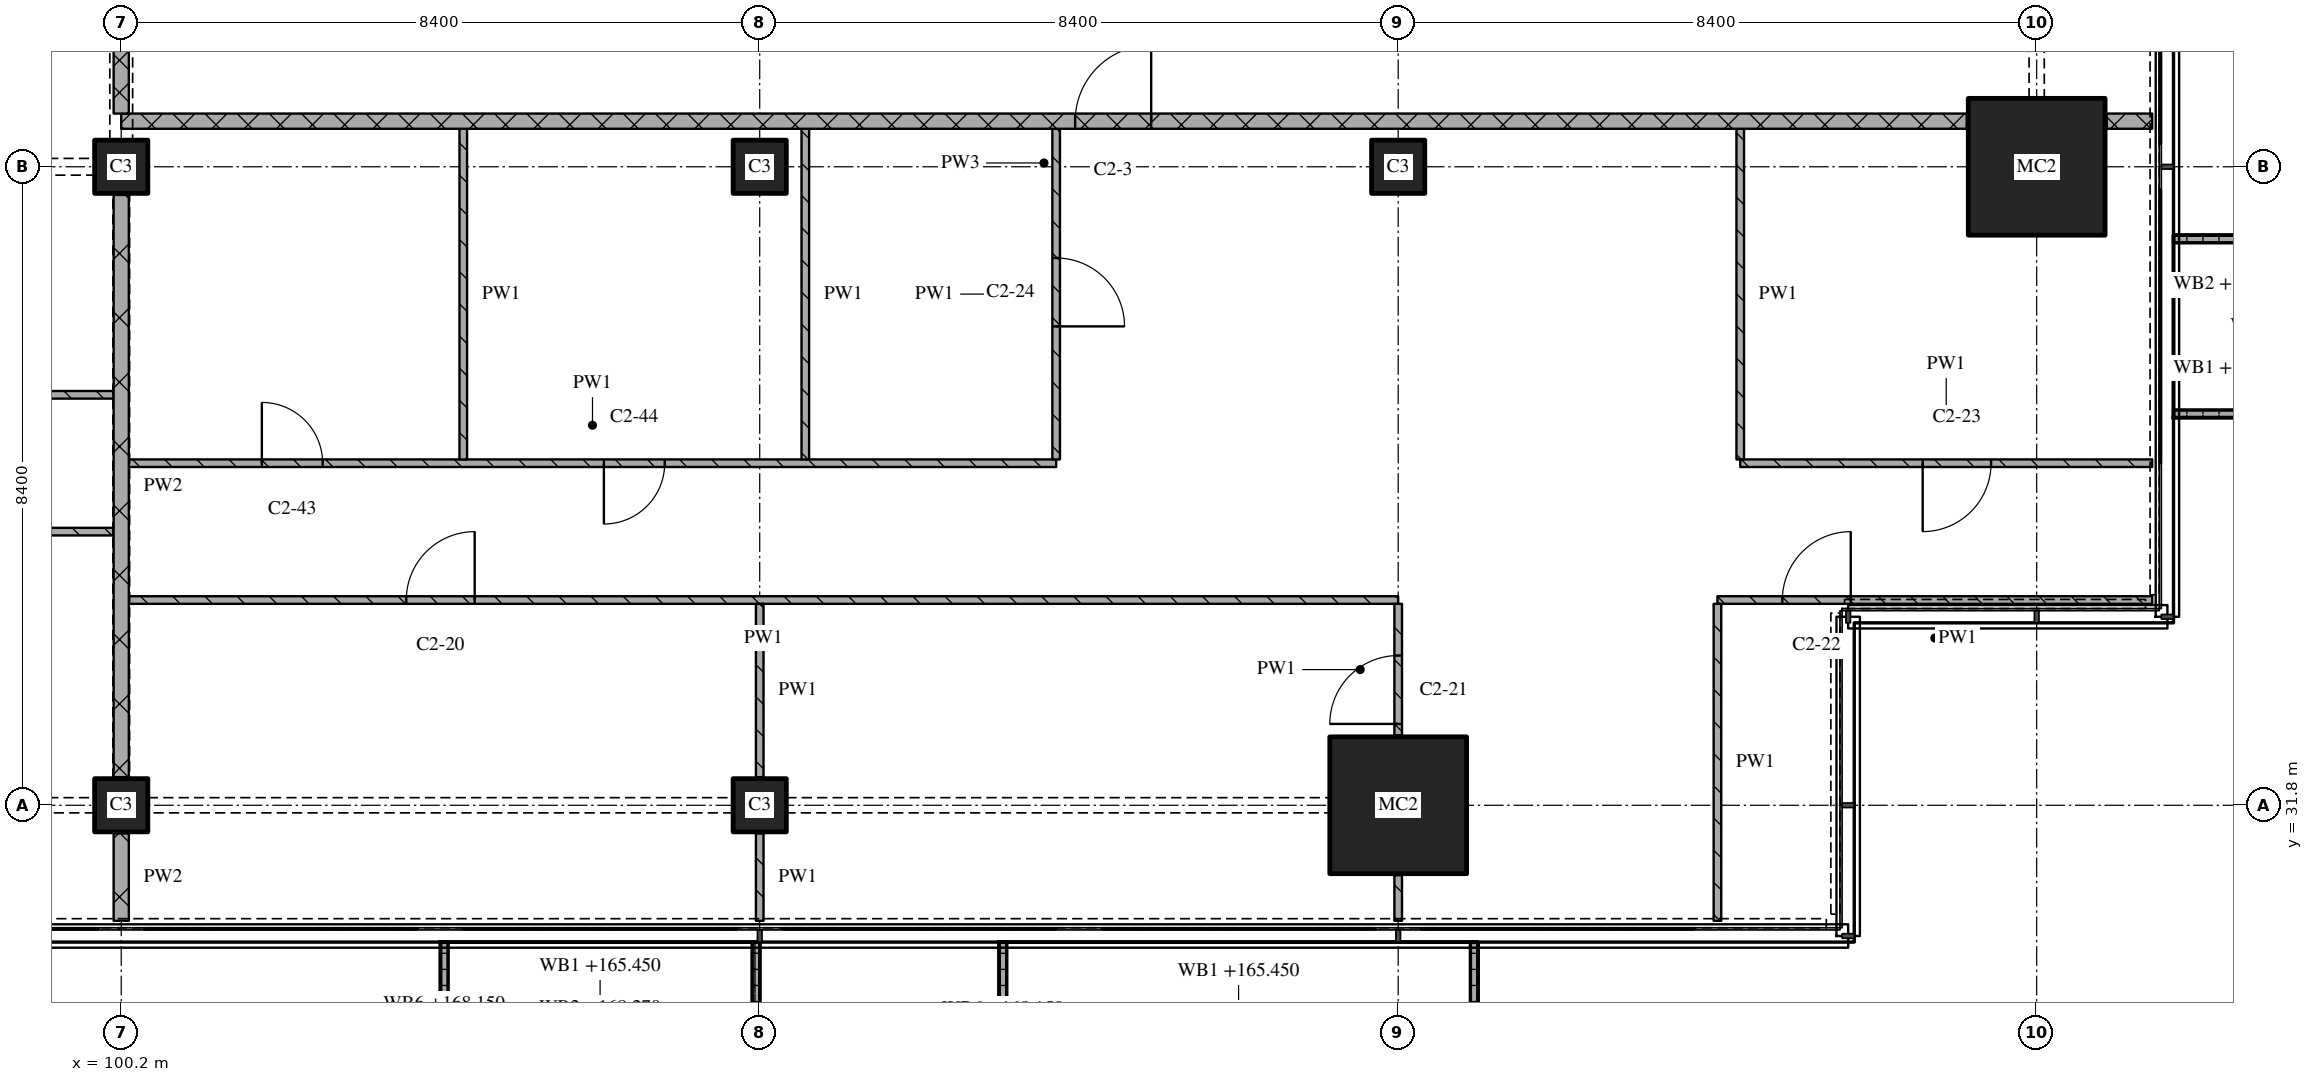
"""IFC4 building model, lengths in metres.
Left out: names, types, materials, properties, quantities, classifications, styles, units other than length and angle.
Written with IfcOpenShell. Run it as: python <this file> out.ifc"""

import sys

from ifc_helpers import new_model, si_unit, direction, frame, frame_2d, origin, origin_2d, place, context, subcontext, project, spatial, polyline, rectangle, outline, extrude, element, fill, save


model = new_model("IFC4")
c1 = context("Model", 3, precision=1e-05, world=origin(), true_north=direction((0.0, 1.0)))
c2 = subcontext(c1, "Body", "Model", "MODEL_VIEW")
j1 = project(units=[si_unit("LENGTHUNIT", "METRE"), si_unit("PLANEANGLEUNIT", "RADIAN")], contexts=[c1])
p1 = place(None, origin())
s1 = spatial("IfcSite", under=j1, at=p1, CompositionType="ELEMENT")
p2 = place(p1, origin())
s2 = spatial("IfcBuilding", under=s1, at=p2, CompositionType="ELEMENT")
p3 = place(p2, frame((0.0, 0.0, 165.45)))
s3 = spatial("IfcBuildingStorey", under=s2, at=p3, CompositionType="ELEMENT", Elevation=165.45)
for number, where, z_axis, x_axis in (
    (1, (100.2, 31.8, 0.0), (0.0, 0.0, 1.0), (1.0, 0.0, 0.0)),
    (2, (100.2, 40.2, 0.0), (0.0, 0.0, 1.0), (1.0, 0.0, 0.0)),
    (3, (108.6, 31.8, 0.0), (0.0, 0.0, 1.0), (1.0, 0.0, 0.0)),
    (4, (108.6, 40.2, 0.0), (0.0, 0.0, 1.0), (1.0, 0.0, 0.0)),
):
    element("IfcColumn", number, at=place(p3, frame(where, z_axis=z_axis, x_axis=x_axis)), inside=s3, PredefinedType="COLUMN", context=c2, shape_type="SweptSolid", body=[
        extrude(rectangle(XDim=0.7, YDim=0.7, at=origin_2d()), origin(), (0.0, 0.0, 1.0), 3.6),
    ])
p4 = place(p3, frame((117.0, 31.8, 0.0), z_axis=(0.0, 0.0, 1.0), x_axis=(1.0, 0.0, 0.0)))
e5 = element("IfcColumn", 5, at=p4, inside=s3, PredefinedType="COLUMN", context=c2, shape_type="SweptSolid", body=[
    extrude(rectangle(XDim=1.8, YDim=1.8, at=origin_2d()), origin(), (0.0, 0.0, 1.0), 3.6),
])
p5 = place(p3, frame((117.0, 40.2, 0.0), z_axis=(0.0, 0.0, 1.0), x_axis=(1.0, 0.0, 0.0)))
e6 = element("IfcColumn", 6, at=p5, inside=s3, PredefinedType="COLUMN", context=c2, shape_type="SweptSolid", body=[
    extrude(rectangle(XDim=0.7, YDim=0.7, at=origin_2d()), origin(), (0.0, 0.0, 1.0), 3.6),
])
p6 = place(p3, frame((125.4, 40.2, 0.0), z_axis=(0.0, 0.0, 1.0), x_axis=(1.0, 0.0, 0.0)))
e7 = element("IfcColumn", 7, at=p6, inside=s3, PredefinedType="COLUMN", context=c2, shape_type="SweptSolid", body=[
    extrude(rectangle(XDim=1.8, YDim=1.8, at=origin_2d()), origin(), (0.0, 0.0, 1.0), 3.6),
])
p7 = place(p3, origin())
e8 = element("IfcWall", 8, at=p7, inside=s3, PredefinedType="SOLIDWALL", context=c2, shape_type="SweptSolid", body=[
    extrude(outline(polyline([(104.4, 30.0), (104.5, 30.0), (104.5, 28.367), (108.5, 28.367), (108.5, 30.0), (108.6, 30.0), (108.6, 28.267), (104.4, 28.267), (104.4, 30.0)])), origin(), (0.0, 0.0, 1.0), 1.0),
])
p8 = place(p3, origin())
e9 = element("IfcWall", 9, at=p8, inside=s3, PredefinedType="SOLIDWALL", context=c2, shape_type="SweptSolid", body=[
    extrude(outline(polyline([(111.75, 30.0), (111.85, 30.0), (111.85, 28.233), (117.95, 28.233), (117.95, 30.0), (118.05, 30.0), (118.05, 28.133), (111.75, 28.133), (111.75, 30.0)])), origin(), (0.0, 0.0, 1.0), 1.0),
])
p9 = place(p3, origin())
e10 = element("IfcWall", 10, at=p9, inside=s3, PredefinedType="SOLIDWALL", context=c2, shape_type="SweptSolid", body=[
    extrude(outline(polyline([(127.2, 36.9), (127.2, 37.0), (128.7, 37.0), (128.7, 39.2), (127.2, 39.2), (127.2, 39.3), (128.8, 39.3), (128.8, 36.9), (127.2, 36.9)])), origin(), (0.0, 0.0, 1.0), 1.0),
])
p10 = place(p3, frame((117.0, 34.5, 0.0), z_axis=(0.0, 0.0, 1.0), x_axis=(-1.0, 0.0, 0.0)))
e11 = element("IfcWall", 11, at=p10, inside=s3, PredefinedType="PARTITIONING", context=c2, shape_type="SweptSolid", body=[
    extrude(rectangle(XDim=16.7, YDim=0.1, at=frame_2d((8.35, 0.0))), origin(), (0.0, 0.0, 1.0), 3.32),
])
p11 = place(p10, frame((12.15, 0.0, 0.0)))
e12 = element("IfcOpeningElement", 12, at=p11, cuts=e11, PredefinedType="OPENING", context=c2, shape_type="SweptSolid", body=[
    extrude(rectangle(XDim=0.9, YDim=2.1, at=frame_2d((0.45, 1.05))), frame((0.0, 0.06, 0.0), z_axis=(0.0, -1.0, 0.0), x_axis=(1.0, 0.0, 0.0)), (0.0, 0.0, 1.0), 0.12),
])
p12 = place(p3, frame((126.92, 34.5, 0.0), z_axis=(0.0, 0.0, 1.0), x_axis=(-1.0, 0.0, 0.0)))
e13 = element("IfcWall", 13, at=p12, inside=s3, PredefinedType="PARTITIONING", context=c2, shape_type="SweptSolid", body=[
    extrude(rectangle(XDim=5.72, YDim=0.1, at=frame_2d((2.86, 0.0))), origin(), (0.0, 0.0, 1.0), 3.32),
])
p13 = place(p12, frame((3.966, 0.0, 0.0)))
e14 = element("IfcOpeningElement", 14, at=p13, cuts=e13, PredefinedType="OPENING", context=c2, shape_type="SweptSolid", body=[
    extrude(rectangle(XDim=0.9, YDim=2.1, at=frame_2d((0.45, 1.05))), frame((0.0, 0.06, 0.0), z_axis=(0.0, -1.0, 0.0), x_axis=(1.0, 0.0, 0.0)), (0.0, 0.0, 1.0), 0.12),
])
p14 = place(p3, frame((100.1, 35.4, 0.0), z_axis=(0.0, 0.0, 1.0), x_axis=(-1.0, 0.0, 0.0)))
e15 = element("IfcWall", 15, at=p14, inside=s3, PredefinedType="PARTITIONING", context=c2, shape_type="SweptSolid", body=[
    extrude(rectangle(XDim=20.9, YDim=0.1, at=frame_2d((10.45, 0.0))), origin(), (0.0, 0.0, 1.0), 3.32),
])
p15 = place(p14, frame((1.55, 0.0, 0.0)))
e16 = element("IfcOpeningElement", 16, at=p15, cuts=e15, PredefinedType="OPENING", context=c2, shape_type="SweptSolid", body=[
    extrude(rectangle(XDim=0.9, YDim=2.1, at=frame_2d((0.45, 1.05))), frame((0.0, 0.06, 0.0), z_axis=(0.0, -1.0, 0.0), x_axis=(1.0, 0.0, 0.0)), (0.0, 0.0, 1.0), 0.12),
])
p16 = place(p14, frame((7.85, 0.0, 0.0)))
e17 = element("IfcOpeningElement", 17, at=p16, cuts=e15, PredefinedType="OPENING", context=c2, shape_type="SweptSolid", body=[
    extrude(rectangle(XDim=0.9, YDim=2.1, at=frame_2d((0.45, 1.05))), frame((0.0, 0.06, 0.0), z_axis=(0.0, -1.0, 0.0), x_axis=(1.0, 0.0, 0.0)), (0.0, 0.0, 1.0), 0.12),
])
p17 = place(p14, frame((16.25, 0.0, 0.0)))
e18 = element("IfcOpeningElement", 18, at=p17, cuts=e15, PredefinedType="OPENING", context=c2, shape_type="SweptSolid", body=[
    extrude(rectangle(XDim=0.9, YDim=2.1, at=frame_2d((0.45, 1.05))), frame((0.0, 0.06, 0.0), z_axis=(0.0, -1.0, 0.0), x_axis=(1.0, 0.0, 0.0)), (0.0, 0.0, 1.0), 0.12),
])
p18 = place(p3, frame((100.3, 36.3, 0.0), z_axis=(0.0, 0.0, 1.0), x_axis=(1.0, 0.0, 0.0)))
e19 = element("IfcWall", 19, at=p18, inside=s3, PredefinedType="PARTITIONING", context=c2, shape_type="SweptSolid", body=[
    extrude(rectangle(XDim=12.2, YDim=0.1, at=frame_2d((6.1, 0.0))), origin(), (0.0, 0.0, 1.0), 3.32),
])
p19 = place(p18, frame((1.75, 0.0, 0.0)))
e20 = element("IfcOpeningElement", 20, at=p19, cuts=e19, PredefinedType="OPENING", context=c2, shape_type="SweptSolid", body=[
    extrude(rectangle(XDim=0.8, YDim=2.1, at=frame_2d((0.4, 1.05))), frame((0.0, 0.06, 0.0), z_axis=(0.0, -1.0, 0.0), x_axis=(1.0, 0.0, 0.0)), (0.0, 0.0, 1.0), 0.12),
])
p20 = place(p18, frame((6.25, 0.0, 0.0)))
e21 = element("IfcOpeningElement", 21, at=p20, cuts=e19, PredefinedType="OPENING", context=c2, shape_type="SweptSolid", body=[
    extrude(rectangle(XDim=0.8, YDim=2.1, at=frame_2d((0.4, 1.05))), frame((0.0, 0.06, 0.0), z_axis=(0.0, -1.0, 0.0), x_axis=(1.0, 0.0, 0.0)), (0.0, 0.0, 1.0), 0.12),
])
p21 = place(p3, frame((121.5, 36.3, 0.0), z_axis=(0.0, 0.0, 1.0), x_axis=(1.0, 0.0, 0.0)))
e22 = element("IfcWall", 22, at=p21, inside=s3, PredefinedType="PARTITIONING", context=c2, shape_type="SweptSolid", body=[
    extrude(rectangle(XDim=5.42, YDim=0.1, at=frame_2d((2.71, 0.0))), origin(), (0.0, 0.0, 1.0), 3.32),
])
p22 = place(p21, frame((2.4, 0.0, 0.0)))
e23 = element("IfcOpeningElement", 23, at=p22, cuts=e22, PredefinedType="OPENING", context=c2, shape_type="SweptSolid", body=[
    extrude(rectangle(XDim=0.9, YDim=2.1, at=frame_2d((0.45, 1.05))), frame((0.0, 0.06, 0.0), z_axis=(0.0, -1.0, 0.0), x_axis=(1.0, 0.0, 0.0)), (0.0, 0.0, 1.0), 0.12),
])
p23 = place(p3, frame((94.733, 37.2, 0.0), z_axis=(0.0, 0.0, 1.0), x_axis=(1.0, 0.0, 0.0)))
e24 = element("IfcWall", 24, at=p23, inside=s3, PredefinedType="PARTITIONING", context=c2, shape_type="SweptSolid", body=[
    extrude(rectangle(XDim=5.367, YDim=0.1, at=frame_2d((2.683, 0.0))), origin(), (0.0, 0.0, 1.0), 3.32),
])
p24 = place(p23, frame((2.283, 0.0, 0.0)))
e25 = element("IfcOpeningElement", 25, at=p24, cuts=e24, PredefinedType="OPENING", context=c2, shape_type="SweptSolid", body=[
    extrude(rectangle(XDim=0.9, YDim=2.1, at=frame_2d((0.45, 1.05))), frame((0.0, 0.06, 0.0), z_axis=(0.0, -1.0, 0.0), x_axis=(1.0, 0.0, 0.0)), (0.0, 0.0, 1.0), 0.12),
])
p25 = place(p3, frame((124.48, 40.8, 0.0), z_axis=(0.0, 0.0, 1.0), x_axis=(-1.0, 0.0, 0.0)))
e26 = element("IfcWall", 26, at=p25, inside=s3, PredefinedType="PARTITIONING", context=c2, shape_type="SweptSolid", body=[
    extrude(rectangle(XDim=24.28, YDim=0.2, at=frame_2d((12.14, 0.0))), origin(), (0.0, 0.0, 1.0), 3.32),
])
p26 = place(p25, frame((10.73, 0.0, 0.0)))
e27 = element("IfcOpeningElement", 27, at=p26, cuts=e26, PredefinedType="OPENING", context=c2, shape_type="SweptSolid", body=[
    extrude(rectangle(XDim=1.0, YDim=2.1, at=frame_2d((0.5, 1.05))), frame((0.0, 0.11, 0.0), z_axis=(0.0, -1.0, 0.0), x_axis=(1.0, 0.0, 0.0)), (0.0, 0.0, 1.0), 0.22),
])
p27 = place(p3, frame((126.32, 40.8, 0.0), z_axis=(0.0, 0.0, 1.0), x_axis=(1.0, 0.0, 0.0)))
e28 = element("IfcWall", 28, at=p27, inside=s3, PredefinedType="PARTITIONING", context=c2, shape_type="SweptSolid", body=[
    extrude(rectangle(XDim=0.6, YDim=0.2, at=frame_2d((0.3, 0.0))), origin(), (0.0, 0.0, 1.0), 3.32),
])
p28 = place(p3, frame((100.2, 43.1, 0.0), z_axis=(0.0, 0.0, 1.0), x_axis=(0.0, -1.0, 0.0)))
e29 = element("IfcWall", 29, at=p28, inside=s3, PredefinedType="PARTITIONING", context=c2, shape_type="SweptSolid", body=[
    extrude(rectangle(XDim=2.2, YDim=0.2, at=frame_2d((1.1, 0.0))), origin(), (0.0, 0.0, 1.0), 2.43),
])
p29 = place(p3, frame((100.2, 31.43, 0.0), z_axis=(0.0, 0.0, 1.0), x_axis=(0.0, -1.0, 0.0)))
e30 = element("IfcWall", 30, at=p29, inside=s3, PredefinedType="PARTITIONING", context=c2, shape_type="SweptSolid", body=[
    extrude(rectangle(XDim=1.15, YDim=0.2, at=frame_2d((0.575, 0.0))), origin(), (0.0, 0.0, 1.0), 3.32),
])
p30 = place(p3, frame((100.2, 39.83, 0.0), z_axis=(0.0, 0.0, 1.0), x_axis=(0.0, -1.0, 0.0)))
e31 = element("IfcWall", 31, at=p30, inside=s3, PredefinedType="PARTITIONING", context=c2, shape_type="SweptSolid", body=[
    extrude(rectangle(XDim=7.66, YDim=0.2, at=frame_2d((3.83, 0.0))), origin(), (0.0, 0.0, 1.0), 2.72),
])
p31 = place(p3, frame((104.7, 40.7, 0.0), z_axis=(0.0, 0.0, 1.0), x_axis=(0.0, -1.0, 0.0)))
e32 = element("IfcWall", 32, at=p31, inside=s3, PredefinedType="PARTITIONING", context=c2, shape_type="SweptSolid", body=[
    extrude(rectangle(XDim=4.35, YDim=0.1, at=frame_2d((2.175, 0.0))), origin(), (0.0, 0.0, 1.0), 3.32),
])
p32 = place(p3, frame((108.6, 31.43, 0.0), z_axis=(0.0, 0.0, 1.0), x_axis=(0.0, -1.0, 0.0)))
e33 = element("IfcWall", 33, at=p32, inside=s3, PredefinedType="PARTITIONING", context=c2, shape_type="SweptSolid", body=[
    extrude(rectangle(XDim=1.15, YDim=0.1, at=frame_2d((0.575, 0.0))), origin(), (0.0, 0.0, 1.0), 3.32),
])
p33 = place(p3, frame((108.6, 34.45, 0.0), z_axis=(0.0, 0.0, 1.0), x_axis=(0.0, -1.0, 0.0)))
e34 = element("IfcWall", 34, at=p33, inside=s3, PredefinedType="PARTITIONING", context=c2, shape_type="SweptSolid", body=[
    extrude(rectangle(XDim=2.28, YDim=0.1, at=frame_2d((1.14, 0.0))), origin(), (0.0, 0.0, 1.0), 3.32),
])
p34 = place(p3, frame((109.2, 40.7, 0.0), z_axis=(0.0, 0.0, 1.0), x_axis=(0.0, -1.0, 0.0)))
e35 = element("IfcWall", 35, at=p34, inside=s3, PredefinedType="PARTITIONING", context=c2, shape_type="SweptSolid", body=[
    extrude(rectangle(XDim=4.35, YDim=0.1, at=frame_2d((2.175, 0.0))), origin(), (0.0, 0.0, 1.0), 3.32),
])
p35 = place(p3, frame((112.5, 36.35, 0.0), z_axis=(0.0, 0.0, 1.0), x_axis=(0.0, 1.0, 0.0)))
e36 = element("IfcWall", 36, at=p35, inside=s3, PredefinedType="PARTITIONING", context=c2, shape_type="SweptSolid", body=[
    extrude(rectangle(XDim=4.35, YDim=0.1, at=frame_2d((2.175, 0.0))), origin(), (0.0, 0.0, 1.0), 3.32),
])
p36 = place(p35, frame((1.75, 0.0, 0.0)))
e37 = element("IfcOpeningElement", 37, at=p36, cuts=e36, PredefinedType="OPENING", context=c2, shape_type="SweptSolid", body=[
    extrude(rectangle(XDim=0.9, YDim=2.1, at=frame_2d((0.45, 1.05))), frame((0.0, 0.06, 0.0), z_axis=(0.0, -1.0, 0.0), x_axis=(1.0, 0.0, 0.0)), (0.0, 0.0, 1.0), 0.12),
])
p37 = place(p3, frame((117.0, 30.88, 0.0), z_axis=(0.0, 0.0, 1.0), x_axis=(0.0, -1.0, 0.0)))
e38 = element("IfcWall", 38, at=p37, inside=s3, PredefinedType="PARTITIONING", context=c2, shape_type="SweptSolid", body=[
    extrude(rectangle(XDim=0.6, YDim=0.1, at=frame_2d((0.3, 0.0))), origin(), (0.0, 0.0, 1.0), 3.32),
])
p38 = place(p3, frame((117.0, 32.72, 0.0), z_axis=(0.0, 0.0, 1.0), x_axis=(0.0, 1.0, 0.0)))
e39 = element("IfcWall", 39, at=p38, inside=s3, PredefinedType="PARTITIONING", context=c2, shape_type="SweptSolid", body=[
    extrude(rectangle(XDim=1.73, YDim=0.1, at=frame_2d((0.865, 0.0))), origin(), (0.0, 0.0, 1.0), 3.32),
])
p39 = place(p38, frame((0.15, 0.0, 0.0)))
e40 = element("IfcOpeningElement", 40, at=p39, cuts=e39, PredefinedType="OPENING", context=c2, shape_type="SweptSolid", body=[
    extrude(rectangle(XDim=0.9, YDim=2.1, at=frame_2d((0.45, 1.05))), frame((0.0, 0.06, 0.0), z_axis=(0.0, -1.0, 0.0), x_axis=(1.0, 0.0, 0.0)), (0.0, 0.0, 1.0), 0.12),
])
p40 = place(p3, frame((121.2, 34.45, 0.0), z_axis=(0.0, 0.0, 1.0), x_axis=(0.0, -1.0, 0.0)))
e41 = element("IfcWall", 41, at=p40, inside=s3, PredefinedType="PARTITIONING", context=c2, shape_type="SweptSolid", body=[
    extrude(rectangle(XDim=4.17, YDim=0.1, at=frame_2d((2.085, 0.0))), origin(), (0.0, 0.0, 1.0), 3.32),
])
p41 = place(p3, frame((121.5, 40.7, 0.0), z_axis=(0.0, 0.0, 1.0), x_axis=(0.0, -1.0, 0.0)))
e42 = element("IfcWall", 42, at=p41, inside=s3, PredefinedType="PARTITIONING", context=c2, shape_type="SweptSolid", body=[
    extrude(rectangle(XDim=4.35, YDim=0.1, at=frame_2d((2.175, 0.0))), origin(), (0.0, 0.0, 1.0), 3.32),
])
p42 = place(p11, origin())
e43 = element("IfcDoor", 43, at=p42, inside=s3, OperationType="SINGLE_SWING_RIGHT", PredefinedType="DOOR", context=c2, shape_type="SweptSolid", body=[
    extrude(rectangle(XDim=0.9, YDim=2.1, at=frame_2d((0.45, 1.05))), frame((0.0, 0.025, 0.0), z_axis=(0.0, -1.0, 0.0), x_axis=(1.0, 0.0, 0.0)), (0.0, 0.0, 1.0), 0.05),
])
fill(e12, e43)
p43 = place(p13, origin())
e44 = element("IfcDoor", 44, at=p43, inside=s3, OperationType="SINGLE_SWING_RIGHT", PredefinedType="DOOR", context=c2, shape_type="SweptSolid", body=[
    extrude(rectangle(XDim=0.9, YDim=2.1, at=frame_2d((0.45, 1.05))), frame((0.0, 0.025, 0.0), z_axis=(0.0, -1.0, 0.0), x_axis=(1.0, 0.0, 0.0)), (0.0, 0.0, 1.0), 0.05),
])
fill(e14, e44)
p44 = place(p19, origin())
e45 = element("IfcDoor", 45, at=p44, inside=s3, OperationType="SINGLE_SWING_LEFT", PredefinedType="DOOR", context=c2, shape_type="SweptSolid", body=[
    extrude(rectangle(XDim=0.8, YDim=2.1, at=frame_2d((0.4, 1.05))), frame((0.0, 0.025, 0.0), z_axis=(0.0, -1.0, 0.0), x_axis=(1.0, 0.0, 0.0)), (0.0, 0.0, 1.0), 0.05),
])
fill(e20, e45)
p45 = place(p20, origin())
e46 = element("IfcDoor", 46, at=p45, inside=s3, OperationType="SINGLE_SWING_RIGHT", PredefinedType="DOOR", context=c2, shape_type="SweptSolid", body=[
    extrude(rectangle(XDim=0.8, YDim=2.1, at=frame_2d((0.4, 1.05))), frame((0.0, 0.025, 0.0), z_axis=(0.0, -1.0, 0.0), x_axis=(1.0, 0.0, 0.0)), (0.0, 0.0, 1.0), 0.05),
])
fill(e21, e46)
p46 = place(p22, origin())
e47 = element("IfcDoor", 47, at=p46, inside=s3, OperationType="SINGLE_SWING_RIGHT", PredefinedType="DOOR", context=c2, shape_type="SweptSolid", body=[
    extrude(rectangle(XDim=0.9, YDim=2.1, at=frame_2d((0.45, 1.05))), frame((0.0, 0.025, 0.0), z_axis=(0.0, -1.0, 0.0), x_axis=(1.0, 0.0, 0.0)), (0.0, 0.0, 1.0), 0.05),
])
fill(e23, e47)
p47 = place(p26, origin())
e48 = element("IfcDoor", 48, at=p47, inside=s3, OperationType="SINGLE_SWING_RIGHT", PredefinedType="DOOR", context=c2, shape_type="SweptSolid", body=[
    extrude(rectangle(XDim=1.0, YDim=2.1, at=frame_2d((0.5, 1.05))), frame((0.0, 0.025, 0.0), z_axis=(0.0, -1.0, 0.0), x_axis=(1.0, 0.0, 0.0)), (0.0, 0.0, 1.0), 0.05),
])
fill(e27, e48)
p48 = place(p36, origin())
e49 = element("IfcDoor", 49, at=p48, inside=s3, OperationType="SINGLE_SWING_RIGHT", PredefinedType="DOOR", context=c2, shape_type="SweptSolid", body=[
    extrude(rectangle(XDim=0.9, YDim=2.1, at=frame_2d((0.45, 1.05))), frame((0.0, 0.025, 0.0), z_axis=(0.0, -1.0, 0.0), x_axis=(1.0, 0.0, 0.0)), (0.0, 0.0, 1.0), 0.05),
])
fill(e37, e49)
p49 = place(p39, origin())
e50 = element("IfcDoor", 50, at=p49, inside=s3, OperationType="SINGLE_SWING_LEFT", PredefinedType="DOOR", context=c2, shape_type="SweptSolid", body=[
    extrude(rectangle(XDim=0.9, YDim=2.1, at=frame_2d((0.45, 1.05))), frame((0.0, 0.025, 0.0), z_axis=(0.0, -1.0, 0.0), x_axis=(1.0, 0.0, 0.0)), (0.0, 0.0, 1.0), 0.05),
])
fill(e40, e50)
save(model, sys.argv[1])
